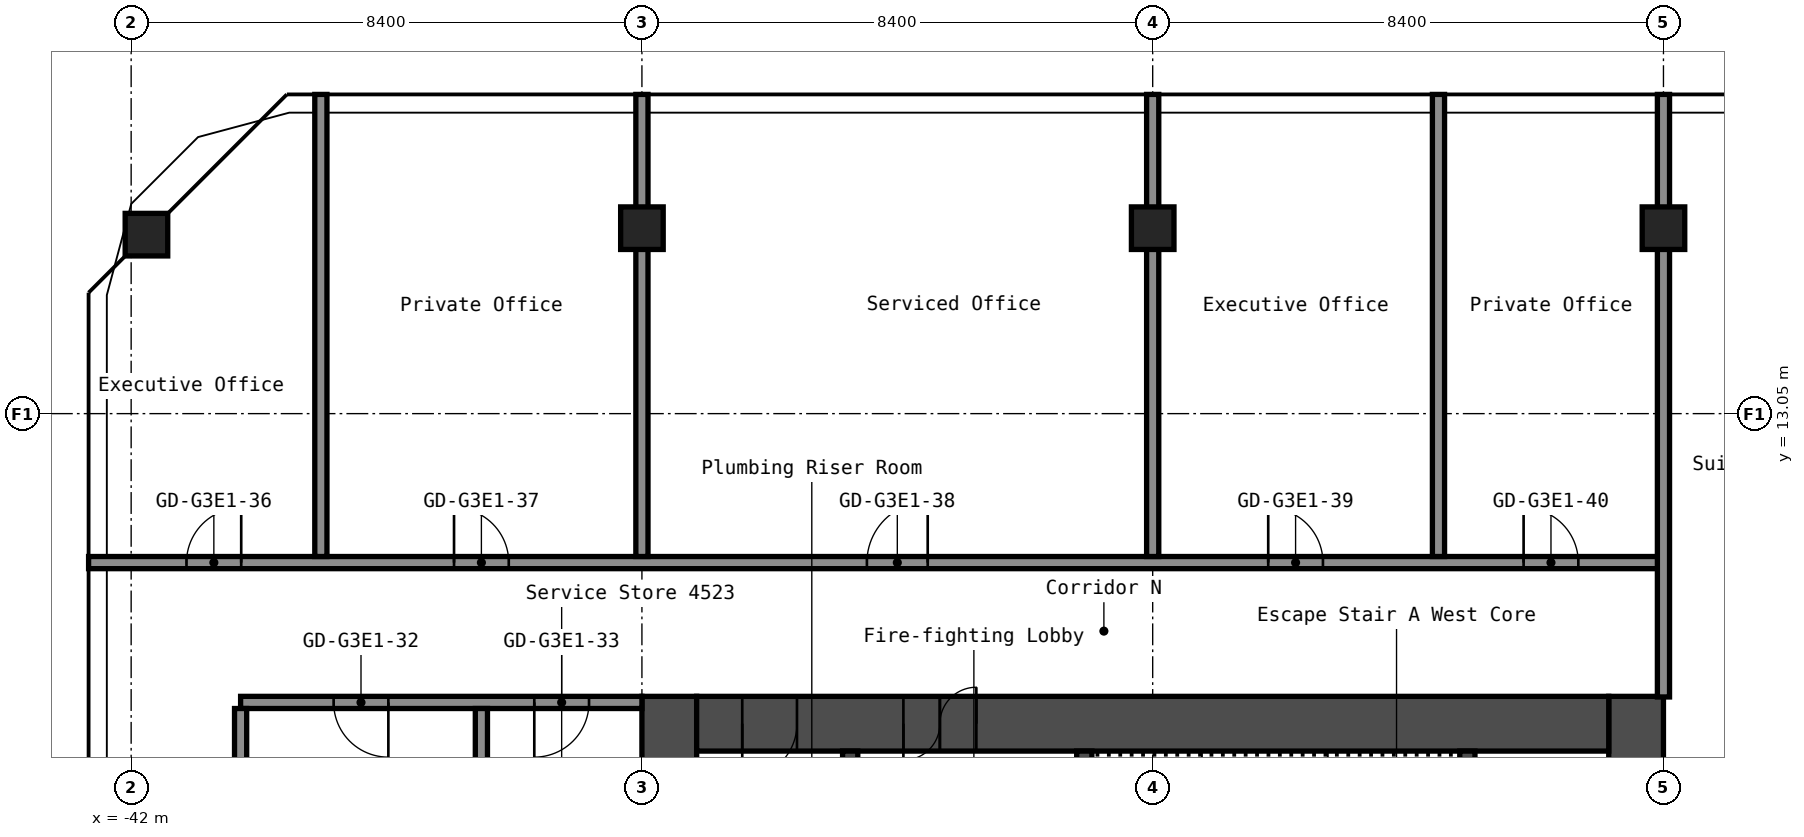
"""IFC4 building model, lengths in metres.
Left out: names, types, materials, properties, quantities, classifications, styles, units other than length and angle.
Written with IfcOpenShell. Run it as: python <this file> out.ifc"""

import sys

from ifc_helpers import new_model, si_unit, direction, frame, frame_2d, origin, origin_2d, place, context, subcontext, project, spatial, rectangle, hollow_rectangle, extrude, element, fill, save


model = new_model("IFC4")
c1 = context("Model", 3, precision=1e-05, world=origin(), true_north=direction((0.0, 1.0)))
c2 = subcontext(c1, "Body", "Model", "MODEL_VIEW")
j1 = project(units=[si_unit("LENGTHUNIT", "METRE"), si_unit("PLANEANGLEUNIT", "RADIAN")], contexts=[c1])
p1 = place(None, origin())
s1 = spatial("IfcSite", under=j1, at=p1, CompositionType="ELEMENT")
p2 = place(p1, origin())
s2 = spatial("IfcBuilding", under=s1, at=p2, CompositionType="ELEMENT")
p3 = place(p2, frame((0.0, 0.0, 159.8)))
s3 = spatial("IfcBuildingStorey", under=s2, at=p3, CompositionType="ELEMENT", Elevation=159.8)
for number, where, z_axis, x_axis in (
    (1, (-41.749, 15.994, 0.0), (0.0, 0.0, 1.0), (1.0, 0.0, 0.0)),
    (2, (-33.6, 16.1, 0.0), (0.0, 0.0, 1.0), (1.0, 0.0, 0.0)),
    (3, (-25.2, 16.1, 0.0), (0.0, 0.0, 1.0), (1.0, 0.0, 0.0)),
    (4, (-16.8, 16.1, 0.0), (0.0, 0.0, 1.0), (1.0, 0.0, 0.0)),
):
    element("IfcColumn", number, at=place(p3, frame(where, z_axis=z_axis, x_axis=x_axis)), inside=s3, PredefinedType="COLUMN", context=c2, shape_type="SweptSolid", body=[
        extrude(hollow_rectangle(XDim=0.7, YDim=0.7, WallThickness=0.028, at=origin_2d()), origin(), (0.0, 0.0, 1.0), 2.75),
    ])
p4 = place(p3, frame((-17.25, -8.4, 0.0), z_axis=(0.0, 0.0, 1.0), x_axis=(0.0, 1.0, 0.0)))
e5 = element("IfcWall", 5, at=p4, inside=s3, PredefinedType="SHEAR", context=c2, shape_type="SweptSolid", body=[
    extrude(rectangle(XDim=16.8, YDim=0.9, at=frame_2d((8.4, 0.0))), origin(), (0.0, 0.0, 1.0), 2.75),
])
p5 = place(p4, frame((7.1, 0.0, 0.0)))
e6 = element("IfcOpeningElement", 6, at=p5, cuts=e5, PredefinedType="OPENING", context=c2, shape_type="SweptSolid", body=[
    extrude(rectangle(XDim=1.6, YDim=2.1, at=frame_2d((0.8, 1.05))), frame((0.0, 0.46, 0.0), z_axis=(0.0, -1.0, 0.0), x_axis=(1.0, 0.0, 0.0)), (0.0, 0.0, 1.0), 0.92),
])
p6 = place(p3, frame((-33.15, -8.4, 0.0), z_axis=(0.0, 0.0, 1.0), x_axis=(0.0, 1.0, 0.0)))
e7 = element("IfcWall", 7, at=p6, inside=s3, PredefinedType="SHEAR", context=c2, shape_type="SweptSolid", body=[
    extrude(rectangle(XDim=16.8, YDim=0.9, at=frame_2d((8.4, 0.0))), origin(), (0.0, 0.0, 1.0), 2.75),
])
p7 = place(p3, frame((-32.7, 7.95, 0.0), z_axis=(0.0, 0.0, 1.0), x_axis=(1.0, 0.0, 0.0)))
e8 = element("IfcWall", 8, at=p7, inside=s3, PredefinedType="SHEAR", context=c2, shape_type="SweptSolid", body=[
    extrude(rectangle(XDim=15.0, YDim=0.9, at=frame_2d((7.5, 0.0))), origin(), (0.0, 0.0, 1.0), 2.75),
])
p8 = place(p7, frame((3.4, 0.0, 0.0)))
e9 = element("IfcOpeningElement", 9, at=p8, cuts=e8, PredefinedType="OPENING", context=c2, shape_type="SweptSolid", body=[
    extrude(rectangle(XDim=1.2, YDim=2.1, at=frame_2d((0.6, 1.05))), frame((0.0, 0.46, 0.0), z_axis=(0.0, -1.0, 0.0), x_axis=(1.0, 0.0, 0.0)), (0.0, 0.0, 1.0), 0.92),
])
p9 = place(p7, frame((0.75, 0.0, 0.0)))
e10 = element("IfcOpeningElement", 10, at=p9, cuts=e8, PredefinedType="OPENING", context=c2, shape_type="SweptSolid", body=[
    extrude(rectangle(XDim=0.9, YDim=2.1, at=frame_2d((0.45, 1.05))), frame((0.0, 0.46, 0.0), z_axis=(0.0, -1.0, 0.0), x_axis=(1.0, 0.0, 0.0)), (0.0, 0.0, 1.0), 0.92),
])
p10 = place(p3, frame((-20.025, 1.2, 0.0), z_axis=(0.0, 0.0, 1.0), x_axis=(0.0, 1.0, 0.0)))
e11 = element("IfcWall", 11, at=p10, inside=s3, PredefinedType="SHEAR", context=c2, shape_type="SweptSolid", body=[
    extrude(rectangle(XDim=6.3, YDim=0.25, at=frame_2d((3.15, 0.0))), origin(), (0.0, 0.0, 1.0), 2.75),
])
p11 = place(p3, frame((-26.325, 3.75, 0.0), z_axis=(0.0, 0.0, 1.0), x_axis=(0.0, 1.0, 0.0)))
e12 = element("IfcWall", 12, at=p11, inside=s3, PredefinedType="SHEAR", context=c2, shape_type="SweptSolid", body=[
    extrude(rectangle(XDim=3.75, YDim=0.25, at=frame_2d((1.875, 0.0))), origin(), (0.0, 0.0, 1.0), 2.75),
])
p12 = place(p11, frame((1.25, 0.0, 0.0)))
e13 = element("IfcOpeningElement", 13, at=p12, cuts=e12, PredefinedType="OPENING", context=c2, shape_type="SweptSolid", body=[
    extrude(rectangle(XDim=1.2, YDim=2.1, at=frame_2d((0.6, 1.05))), frame((0.0, 0.135, 0.0), z_axis=(0.0, -1.0, 0.0), x_axis=(1.0, 0.0, 0.0)), (0.0, 0.0, 1.0), 0.27),
])
p13 = place(p3, frame((-30.175, 1.45, 0.0), z_axis=(0.0, 0.0, 1.0), x_axis=(0.0, 1.0, 0.0)))
e14 = element("IfcWall", 14, at=p13, inside=s3, PredefinedType="SHEAR", context=c2, shape_type="SweptSolid", body=[
    extrude(rectangle(XDim=6.05, YDim=0.25, at=frame_2d((3.025, 0.0))), origin(), (0.0, 0.0, 1.0), 2.75),
])
p14 = place(p13, frame((2.625, 0.0, 0.0)))
e15 = element("IfcOpeningElement", 15, at=p14, cuts=e14, PredefinedType="OPENING", context=c2, shape_type="SweptSolid", body=[
    extrude(rectangle(XDim=1.1, YDim=2.1, at=frame_2d((0.55, 1.05))), frame((0.0, 0.135, 0.0), z_axis=(0.0, -1.0, 0.0), x_axis=(1.0, 0.0, 0.0)), (0.0, 0.0, 1.0), 0.27),
])
p15 = place(p3, frame((-40.2, 8.3, 0.0), z_axis=(0.0, 0.0, 1.0), x_axis=(1.0, 0.0, 0.0)))
e16 = element("IfcWall", 16, at=p15, inside=s3, PredefinedType="PARTITIONING", context=c2, shape_type="SweptSolid", body=[
    extrude(rectangle(XDim=6.6, YDim=0.2, at=frame_2d((3.3, 0.0))), origin(), (0.0, 0.0, 1.0), 2.75),
])
p16 = place(p15, frame((1.53, 0.0, 0.0)))
e17 = element("IfcOpeningElement", 17, at=p16, cuts=e16, PredefinedType="OPENING", context=c2, shape_type="SweptSolid", body=[
    extrude(rectangle(XDim=0.9, YDim=2.1, at=frame_2d((0.45, 1.05))), frame((0.0, 0.11, 0.0), z_axis=(0.0, -1.0, 0.0), x_axis=(1.0, 0.0, 0.0)), (0.0, 0.0, 1.0), 0.22),
])
p17 = place(p15, frame((4.83, 0.0, 0.0)))
e18 = element("IfcOpeningElement", 18, at=p17, cuts=e16, PredefinedType="OPENING", context=c2, shape_type="SweptSolid", body=[
    extrude(rectangle(XDim=0.9, YDim=2.1, at=frame_2d((0.45, 1.05))), frame((0.0, 0.11, 0.0), z_axis=(0.0, -1.0, 0.0), x_axis=(1.0, 0.0, 0.0)), (0.0, 0.0, 1.0), 0.22),
])
p18 = place(p3, frame((-42.7, 10.6, 0.0), z_axis=(0.0, 0.0, 1.0), x_axis=(1.0, 0.0, 0.0)))
e19 = element("IfcWall", 19, at=p18, inside=s3, PredefinedType="PARTITIONING", context=c2, shape_type="SweptSolid", body=[
    extrude(rectangle(XDim=25.9, YDim=0.2, at=frame_2d((12.95, 0.0))), origin(), (0.0, 0.0, 1.0), 2.75),
])
p19 = place(p18, frame((1.61, 0.0, 0.0)))
e20 = element("IfcOpeningElement", 20, at=p19, cuts=e19, PredefinedType="OPENING", context=c2, shape_type="SweptSolid", body=[
    extrude(rectangle(XDim=0.9, YDim=2.1, at=frame_2d((0.45, 1.05))), frame((0.0, 0.11, 0.0), z_axis=(0.0, -1.0, 0.0), x_axis=(1.0, 0.0, 0.0)), (0.0, 0.0, 1.0), 0.22),
])
p20 = place(p18, frame((6.01, 0.0, 0.0)))
e21 = element("IfcOpeningElement", 21, at=p20, cuts=e19, PredefinedType="OPENING", context=c2, shape_type="SweptSolid", body=[
    extrude(rectangle(XDim=0.9, YDim=2.1, at=frame_2d((0.45, 1.05))), frame((0.0, 0.11, 0.0), z_axis=(0.0, -1.0, 0.0), x_axis=(1.0, 0.0, 0.0)), (0.0, 0.0, 1.0), 0.22),
])
p21 = place(p18, frame((12.8, 0.0, 0.0)))
e22 = element("IfcOpeningElement", 22, at=p21, cuts=e19, PredefinedType="OPENING", context=c2, shape_type="SweptSolid", body=[
    extrude(rectangle(XDim=1.0, YDim=2.1, at=frame_2d((0.5, 1.05))), frame((0.0, 0.11, 0.0), z_axis=(0.0, -1.0, 0.0), x_axis=(1.0, 0.0, 0.0)), (0.0, 0.0, 1.0), 0.22),
])
p22 = place(p18, frame((19.4, 0.0, 0.0)))
e23 = element("IfcOpeningElement", 23, at=p22, cuts=e19, PredefinedType="OPENING", context=c2, shape_type="SweptSolid", body=[
    extrude(rectangle(XDim=0.9, YDim=2.1, at=frame_2d((0.45, 1.05))), frame((0.0, 0.11, 0.0), z_axis=(0.0, -1.0, 0.0), x_axis=(1.0, 0.0, 0.0)), (0.0, 0.0, 1.0), 0.22),
])
p23 = place(p18, frame((23.6, 0.0, 0.0)))
e24 = element("IfcOpeningElement", 24, at=p23, cuts=e19, PredefinedType="OPENING", context=c2, shape_type="SweptSolid", body=[
    extrude(rectangle(XDim=0.9, YDim=2.1, at=frame_2d((0.45, 1.05))), frame((0.0, 0.11, 0.0), z_axis=(0.0, -1.0, 0.0), x_axis=(1.0, 0.0, 0.0)), (0.0, 0.0, 1.0), 0.22),
])
p24 = place(p3, frame((-40.2, -8.2, 0.0), z_axis=(0.0, 0.0, 1.0), x_axis=(0.0, 1.0, 0.0)))
e25 = element("IfcWall", 25, at=p24, inside=s3, PredefinedType="PARTITIONING", context=c2, shape_type="SweptSolid", body=[
    extrude(rectangle(XDim=16.4, YDim=0.2, at=frame_2d((8.2, 0.0))), origin(), (0.0, 0.0, 1.0), 2.75),
])
p25 = place(p3, frame((-38.88, 10.7, 0.0), z_axis=(0.0, 0.0, 1.0), x_axis=(0.0, 1.0, 0.0)))
e26 = element("IfcWall", 26, at=p25, inside=s3, PredefinedType="PARTITIONING", context=c2, shape_type="SweptSolid", body=[
    extrude(rectangle(XDim=7.6, YDim=0.2, at=frame_2d((3.8, 0.0))), origin(), (0.0, 0.0, 1.0), 2.75),
])
p26 = place(p3, frame((-36.24, 0.0, 0.0), z_axis=(0.0, 0.0, 1.0), x_axis=(0.0, 1.0, 0.0)))
e27 = element("IfcWall", 27, at=p26, inside=s3, PredefinedType="PARTITIONING", context=c2, shape_type="SweptSolid", body=[
    extrude(rectangle(XDim=8.2, YDim=0.2, at=frame_2d((4.1, 0.0))), origin(), (0.0, 0.0, 1.0), 2.75),
])
for number, where, z_axis, x_axis in (
    (28, (-33.6, 10.7, 0.0), (0.0, 0.0, 1.0), (0.0, 1.0, 0.0)),
    (29, (-25.2, 10.7, 0.0), (0.0, 0.0, 1.0), (0.0, 1.0, 0.0)),
    (30, (-20.5, 10.7, 0.0), (0.0, 0.0, 1.0), (0.0, 1.0, 0.0)),
):
    element("IfcWall", number, at=place(p3, frame(where, z_axis=z_axis, x_axis=x_axis)), inside=s3, PredefinedType="PARTITIONING", context=c2, shape_type="SweptSolid", body=[
        extrude(rectangle(XDim=7.6, YDim=0.2, at=frame_2d((3.8, 0.0))), origin(), (0.0, 0.0, 1.0), 2.75),
    ])
p27 = place(p3, frame((-16.8, 8.39, 0.0), z_axis=(0.0, 0.0, 1.0), x_axis=(0.0, 1.0, 0.0)))
e31 = element("IfcWall", 31, at=p27, inside=s3, PredefinedType="PARTITIONING", context=c2, shape_type="SweptSolid", body=[
    extrude(rectangle(XDim=9.91, YDim=0.2, at=frame_2d((4.955, 0.0))), origin(), (0.0, 0.0, 1.0), 2.75),
])
p28 = place(p8, origin())
e32 = element("IfcDoor", 32, at=p28, inside=s3, OperationType="DOUBLE_DOOR_SINGLE_SWING", PredefinedType="DOOR", context=c2, shape_type="SweptSolid", body=[
    extrude(rectangle(XDim=1.2, YDim=2.1, at=frame_2d((0.6, 1.05))), frame((0.0, 0.025, 0.0), z_axis=(0.0, -1.0, 0.0), x_axis=(1.0, 0.0, 0.0)), (0.0, 0.0, 1.0), 0.05),
])
fill(e9, e32)
p29 = place(p9, origin())
e33 = element("IfcDoor", 33, at=p29, inside=s3, OperationType="SINGLE_SWING_LEFT", PredefinedType="DOOR", context=c2, shape_type="SweptSolid", body=[
    extrude(rectangle(XDim=0.9, YDim=2.1, at=frame_2d((0.45, 1.05))), frame((0.0, 0.025, 0.0), z_axis=(0.0, -1.0, 0.0), x_axis=(1.0, 0.0, 0.0)), (0.0, 0.0, 1.0), 0.05),
])
fill(e10, e33)
p30 = place(p16, origin())
e34 = element("IfcDoor", 34, at=p30, inside=s3, OperationType="SINGLE_SWING_RIGHT", PredefinedType="DOOR", context=c2, shape_type="SweptSolid", body=[
    extrude(rectangle(XDim=0.9, YDim=2.1, at=frame_2d((0.45, 1.05))), frame((0.0, 0.025, 0.0), z_axis=(0.0, -1.0, 0.0), x_axis=(1.0, 0.0, 0.0)), (0.0, 0.0, 1.0), 0.05),
])
fill(e17, e34)
p31 = place(p17, origin())
e35 = element("IfcDoor", 35, at=p31, inside=s3, OperationType="SINGLE_SWING_LEFT", PredefinedType="DOOR", context=c2, shape_type="SweptSolid", body=[
    extrude(rectangle(XDim=0.9, YDim=2.1, at=frame_2d((0.45, 1.05))), frame((0.0, 0.025, 0.0), z_axis=(0.0, -1.0, 0.0), x_axis=(1.0, 0.0, 0.0)), (0.0, 0.0, 1.0), 0.05),
])
fill(e18, e35)
p32 = place(p19, origin())
e36 = element("IfcDoor", 36, at=p32, inside=s3, OperationType="SINGLE_SWING_LEFT", PredefinedType="DOOR", context=c2, shape_type="SweptSolid", body=[
    extrude(rectangle(XDim=0.9, YDim=2.1, at=frame_2d((0.45, 1.05))), frame((0.0, 0.025, 0.0), z_axis=(0.0, -1.0, 0.0), x_axis=(1.0, 0.0, 0.0)), (0.0, 0.0, 1.0), 0.05),
])
fill(e20, e36)
p33 = place(p20, origin())
e37 = element("IfcDoor", 37, at=p33, inside=s3, OperationType="SINGLE_SWING_RIGHT", PredefinedType="DOOR", context=c2, shape_type="SweptSolid", body=[
    extrude(rectangle(XDim=0.9, YDim=2.1, at=frame_2d((0.45, 1.05))), frame((0.0, 0.025, 0.0), z_axis=(0.0, -1.0, 0.0), x_axis=(1.0, 0.0, 0.0)), (0.0, 0.0, 1.0), 0.05),
])
fill(e21, e37)
p34 = place(p21, origin())
e38 = element("IfcDoor", 38, at=p34, inside=s3, OperationType="SINGLE_SWING_LEFT", PredefinedType="DOOR", context=c2, shape_type="SweptSolid", body=[
    extrude(rectangle(XDim=1.0, YDim=2.1, at=frame_2d((0.5, 1.05))), frame((0.0, 0.025, 0.0), z_axis=(0.0, -1.0, 0.0), x_axis=(1.0, 0.0, 0.0)), (0.0, 0.0, 1.0), 0.05),
])
fill(e22, e38)
p35 = place(p22, origin())
e39 = element("IfcDoor", 39, at=p35, inside=s3, OperationType="SINGLE_SWING_RIGHT", PredefinedType="DOOR", context=c2, shape_type="SweptSolid", body=[
    extrude(rectangle(XDim=0.9, YDim=2.1, at=frame_2d((0.45, 1.05))), frame((0.0, 0.025, 0.0), z_axis=(0.0, -1.0, 0.0), x_axis=(1.0, 0.0, 0.0)), (0.0, 0.0, 1.0), 0.05),
])
fill(e23, e39)
p36 = place(p23, origin())
e40 = element("IfcDoor", 40, at=p36, inside=s3, OperationType="SINGLE_SWING_RIGHT", PredefinedType="DOOR", context=c2, shape_type="SweptSolid", body=[
    extrude(rectangle(XDim=0.9, YDim=2.1, at=frame_2d((0.45, 1.05))), frame((0.0, 0.025, 0.0), z_axis=(0.0, -1.0, 0.0), x_axis=(1.0, 0.0, 0.0)), (0.0, 0.0, 1.0), 0.05),
])
fill(e24, e40)
save(model, sys.argv[1])
